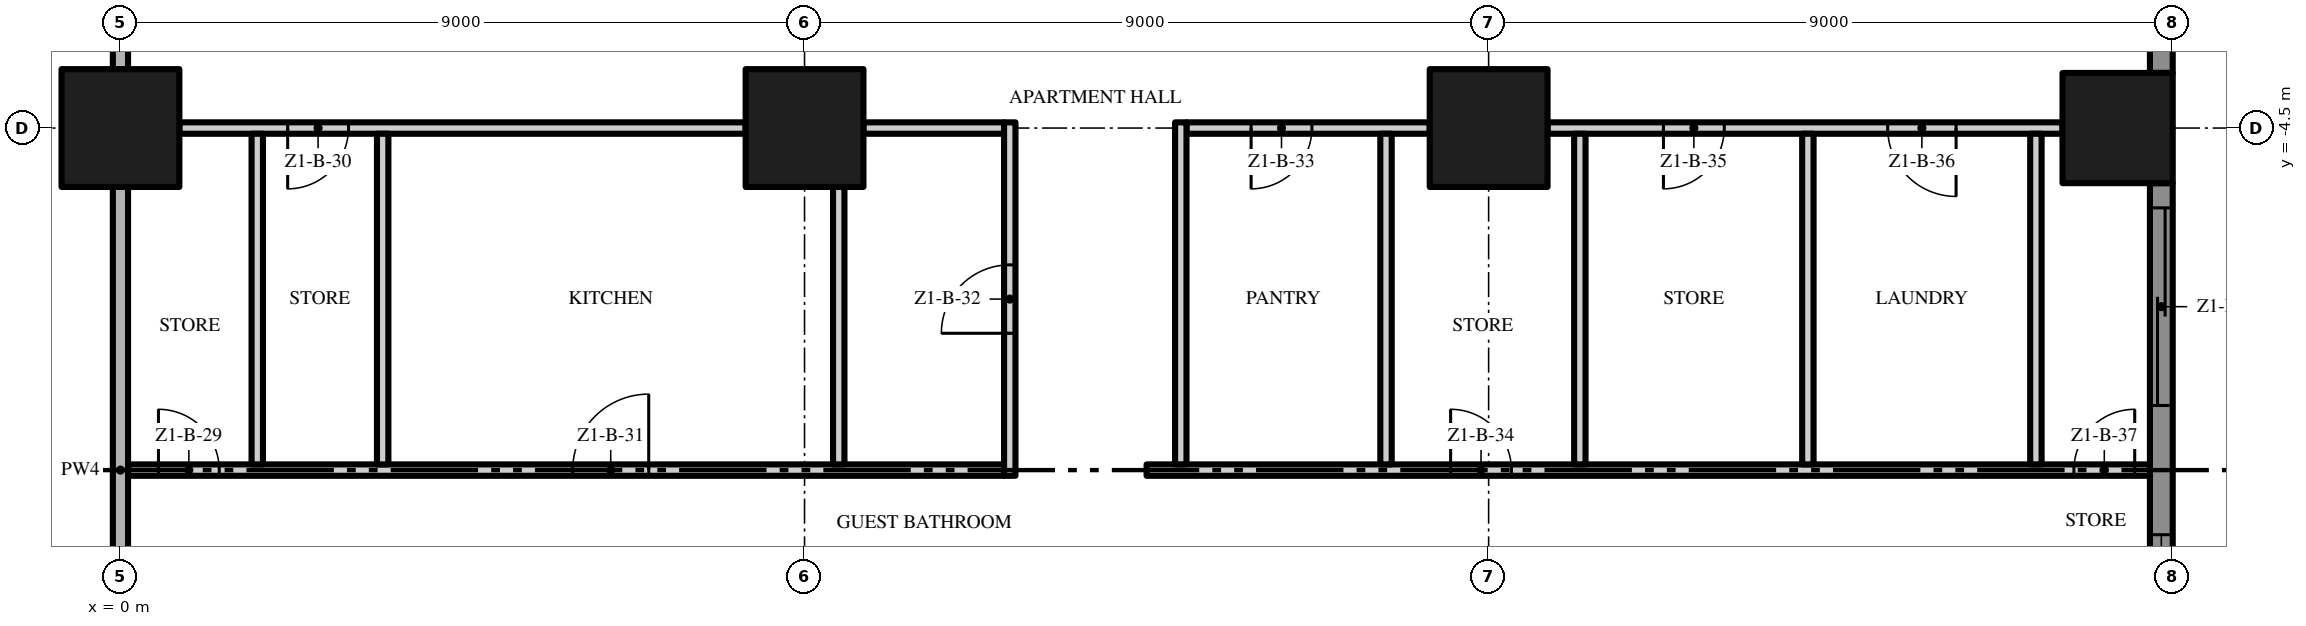
"""IFC4 building model, lengths in metres.
Left out: names, types, materials, properties, quantities, classifications, styles, units other than length and angle.
Written with IfcOpenShell. Run it as: python <this file> out.ifc"""

import sys

from ifc_helpers import new_model, si_unit, direction, frame, frame_2d, origin, origin_2d, place, context, subcontext, project, spatial, polyline, rectangle, outline, extrude, element, fill, save


model = new_model("IFC4")
c1 = context("Model", 3, precision=1e-05, world=origin(), true_north=direction((0.0, 1.0)))
c2 = subcontext(c1, "Body", "Model", "MODEL_VIEW")
j1 = project(units=[si_unit("LENGTHUNIT", "METRE"), si_unit("PLANEANGLEUNIT", "RADIAN")], contexts=[c1])
p1 = place(None, origin())
s1 = spatial("IfcSite", under=j1, at=p1, CompositionType="ELEMENT")
p2 = place(p1, origin())
s2 = spatial("IfcBuilding", under=s1, at=p2, CompositionType="ELEMENT")
p3 = place(p2, frame((0.0, 0.0, 26.4)))
s3 = spatial("IfcBuildingStorey", under=s2, at=p3, CompositionType="ELEMENT", Elevation=26.4)
for number, where, z_axis, x_axis in (
    (1, (0.0, -4.5, 0.0), (0.0, 0.0, 1.0), (1.0, 0.0, 0.0)),
    (2, (18.0, -4.5, 0.0), (0.0, 0.0, 1.0), (1.0, 0.0, 0.0)),
):
    element("IfcColumn", number, at=place(p3, frame(where, z_axis=z_axis, x_axis=x_axis)), inside=s3, PredefinedType="COLUMN", context=c2, shape_type="SweptSolid", body=[
        extrude(rectangle(XDim=1.55, YDim=1.55, at=origin_2d()), origin(), (0.0, 0.0, 1.0), 3.5),
    ])
p4 = place(p3, frame((26.275, -4.5, 0.0), z_axis=(0.0, 0.0, 1.0), x_axis=(1.0, 0.0, 0.0)))
e3 = element("IfcColumn", 3, at=p4, inside=s3, PredefinedType="COLUMN", context=c2, shape_type="SweptSolid", body=[
    extrude(rectangle(XDim=1.45, YDim=1.45, at=origin_2d()), origin(), (0.0, 0.0, 1.0), 3.5),
])
p5 = place(p3, frame((9.0, -4.5, 0.0), z_axis=(0.0, 0.0, 1.0), x_axis=(1.0, 0.0, 0.0)))
e4 = element("IfcColumn", 4, at=p5, inside=s3, PredefinedType="COLUMN", context=c2, shape_type="SweptSolid", body=[
    extrude(rectangle(XDim=1.55, YDim=1.55, at=origin_2d()), origin(), (0.0, 0.0, 1.0), 3.5),
])
p6 = place(p3, frame((26.85, -5.225, 0.0), z_axis=(0.0, 0.0, 1.0), x_axis=(0.0, -1.0, 0.0)))
e5 = element("IfcWall", 5, at=p6, inside=s3, PredefinedType="SOLIDWALL", context=c2, shape_type="SweptSolid", body=[
    extrude(rectangle(XDim=7.55, YDim=0.3, at=frame_2d((3.775, 0.0))), origin(), (0.0, 0.0, 1.0), 3.5),
])
p7 = place(p6, frame((4.625, 0.0, 0.45)))
e6 = element("IfcOpeningElement", 6, at=p7, cuts=e5, PredefinedType="OPENING", context=c2, shape_type="SweptSolid", body=[
    extrude(rectangle(XDim=2.6, YDim=2.65, at=frame_2d((1.3, 1.325))), frame((0.0, 0.16, 0.0), z_axis=(0.0, -1.0, 0.0), x_axis=(1.0, 0.0, 0.0)), (0.0, 0.0, 1.0), 0.32),
])
p8 = place(p6, frame((0.325, 0.0, 0.0)))
e7 = element("IfcOpeningElement", 7, at=p8, cuts=e5, PredefinedType="OPENING", context=c2, shape_type="SweptSolid", body=[
    extrude(rectangle(XDim=2.6, YDim=2.4, at=frame_2d((1.3, 1.2))), frame((0.0, 0.16, 0.0), z_axis=(0.0, -1.0, 0.0), x_axis=(1.0, 0.0, 0.0)), (0.0, 0.0, 1.0), 0.32),
])
p9 = place(p3, frame((26.85, 3.775, 0.0), z_axis=(0.0, 0.0, 1.0), x_axis=(0.0, -1.0, 0.0)))
e8 = element("IfcWall", 8, at=p9, inside=s3, PredefinedType="SOLIDWALL", context=c2, shape_type="SweptSolid", body=[
    extrude(rectangle(XDim=7.55, YDim=0.3, at=frame_2d((3.775, 0.0))), origin(), (0.0, 0.0, 1.0), 3.5),
])
p10 = place(p9, frame((4.625, 0.0, 0.0)))
e9 = element("IfcOpeningElement", 9, at=p10, cuts=e8, PredefinedType="OPENING", context=c2, shape_type="SweptSolid", body=[
    extrude(rectangle(XDim=2.6, YDim=2.4, at=frame_2d((1.3, 1.2))), frame((0.0, 0.16, 0.0), z_axis=(0.0, -1.0, 0.0), x_axis=(1.0, 0.0, 0.0)), (0.0, 0.0, 1.0), 0.32),
])
p11 = place(p9, frame((0.325, 0.0, 0.45)))
e10 = element("IfcOpeningElement", 10, at=p11, cuts=e8, PredefinedType="OPENING", context=c2, shape_type="SweptSolid", body=[
    extrude(rectangle(XDim=2.6, YDim=2.65, at=frame_2d((1.3, 1.325))), frame((0.0, 0.16, 0.0), z_axis=(0.0, -1.0, 0.0), x_axis=(1.0, 0.0, 0.0)), (0.0, 0.0, 1.0), 0.32),
])
p12 = place(p3, origin())
e11 = element("IfcWall", 11, at=p12, inside=s3, PredefinedType="USERDEFINED", context=c2, shape_type="SweptSolid", body=[
    extrude(outline(polyline([(29.649, -18.0), (28.988, -16.5), (28.255, -15.0), (27.731, -13.5), (27.6, -12.375), (27.615, -12.0), (27.951, -10.5), (28.612, -9.0), (29.345, -7.5), (29.869, -6.0), (30.0, -4.875), (29.985, -4.5), (29.649, -3.0), (28.988, -1.5), (28.255, 0.0), (27.731, 1.5), (27.6, 2.625), (27.615, 3.0), (27.951, 4.5), (28.612, 6.0), (29.345, 7.5), (29.869, 9.0), (30.0, 10.125), (29.985, 10.5), (29.649, 12.0), (28.988, 13.5), (28.255, 15.0), (27.731, 16.5), (27.6, 17.625), (27.615, 18.0), (27.365, 18.01), (27.349, 17.615), (27.486, 16.444), (28.024, 14.904), (28.761, 13.395), (29.41, 11.921), (29.736, 10.467), (29.749, 10.135), (29.624, 9.056), (29.114, 7.596), (28.385, 6.105), (27.713, 4.579), (27.366, 3.033), (27.349, 2.615), (27.486, 1.444), (28.024, -0.096), (28.761, -1.605), (29.41, -3.079), (29.736, -4.533), (29.749, -4.865), (29.624, -5.944), (29.114, -7.404), (28.385, -8.895), (27.713, -10.421), (27.366, -11.967), (27.349, -12.385), (27.486, -13.556), (28.024, -15.096), (28.761, -16.605), (29.42, -18.101), (29.649, -18.0)])), origin(), (0.0, 0.0, 1.0), 0.9),
])
p13 = place(p3, frame((0.1, -9.0, 0.0), z_axis=(0.0, 0.0, 1.0), x_axis=(1.0, 0.0, 0.0)))
e12 = element("IfcWall", 12, at=p13, inside=s3, PredefinedType="PARTITIONING", context=c2, shape_type="SweptSolid", body=[
    extrude(rectangle(XDim=11.525, YDim=0.15, at=frame_2d((5.763, 0.0))), origin(), (0.0, 0.0, 1.0), 3.5),
])
p14 = place(p13, frame((0.4, 0.0, 0.0)))
e13 = element("IfcOpeningElement", 13, at=p14, cuts=e12, PredefinedType="OPENING", context=c2, shape_type="SweptSolid", body=[
    extrude(rectangle(XDim=0.8, YDim=2.0, at=frame_2d((0.4, 1.0))), frame((0.0, 0.085, 0.0), z_axis=(0.0, -1.0, 0.0), x_axis=(1.0, 0.0, 0.0)), (0.0, 0.0, 1.0), 0.17),
])
p15 = place(p13, frame((5.85, 0.0, 0.0)))
e14 = element("IfcOpeningElement", 14, at=p15, cuts=e12, PredefinedType="OPENING", context=c2, shape_type="SweptSolid", body=[
    extrude(rectangle(XDim=1.0, YDim=2.4, at=frame_2d((0.5, 1.2))), frame((0.0, 0.085, 0.0), z_axis=(0.0, -1.0, 0.0), x_axis=(1.0, 0.0, 0.0)), (0.0, 0.0, 1.0), 0.17),
])
p16 = place(p3, frame((13.5, -9.0, 0.0), z_axis=(0.0, 0.0, 1.0), x_axis=(1.0, 0.0, 0.0)))
e15 = element("IfcWall", 15, at=p16, inside=s3, PredefinedType="PARTITIONING", context=c2, shape_type="SweptSolid", body=[
    extrude(rectangle(XDim=13.2, YDim=0.15, at=frame_2d((6.6, 0.0))), origin(), (0.0, 0.0, 1.0), 3.5),
])
p17 = place(p16, frame((4.0, 0.0, 0.0)))
e16 = element("IfcOpeningElement", 16, at=p17, cuts=e15, PredefinedType="OPENING", context=c2, shape_type="SweptSolid", body=[
    extrude(rectangle(XDim=0.8, YDim=2.0, at=frame_2d((0.4, 1.0))), frame((0.0, 0.085, 0.0), z_axis=(0.0, -1.0, 0.0), x_axis=(1.0, 0.0, 0.0)), (0.0, 0.0, 1.0), 0.17),
])
p18 = place(p16, frame((12.2, 0.0, 0.0)))
e17 = element("IfcOpeningElement", 17, at=p18, cuts=e15, PredefinedType="OPENING", context=c2, shape_type="SweptSolid", body=[
    extrude(rectangle(XDim=0.8, YDim=2.0, at=frame_2d((0.4, 1.0))), frame((0.0, 0.085, 0.0), z_axis=(0.0, -1.0, 0.0), x_axis=(1.0, 0.0, 0.0)), (0.0, 0.0, 1.0), 0.17),
])
p19 = place(p3, frame((8.225, -4.5, 0.0), z_axis=(0.0, 0.0, 1.0), x_axis=(-1.0, 0.0, 0.0)))
e18 = element("IfcWall", 18, at=p19, inside=s3, PredefinedType="PARTITIONING", context=c2, shape_type="SweptSolid", body=[
    extrude(rectangle(XDim=7.45, YDim=0.15, at=frame_2d((3.725, 0.0))), origin(), (0.0, 0.0, 1.0), 3.5),
])
p20 = place(p19, frame((5.225, 0.0, 0.0)))
e19 = element("IfcOpeningElement", 19, at=p20, cuts=e18, PredefinedType="OPENING", context=c2, shape_type="SweptSolid", body=[
    extrude(rectangle(XDim=0.8, YDim=2.0, at=frame_2d((0.4, 1.0))), frame((0.0, 0.085, 0.0), z_axis=(0.0, -1.0, 0.0), x_axis=(1.0, 0.0, 0.0)), (0.0, 0.0, 1.0), 0.17),
])
p21 = place(p3, frame((9.775, -4.5, 0.0), z_axis=(0.0, 0.0, 1.0), x_axis=(1.0, 0.0, 0.0)))
e20 = element("IfcWall", 20, at=p21, inside=s3, PredefinedType="PARTITIONING", context=c2, shape_type="SweptSolid", body=[
    extrude(rectangle(XDim=1.85, YDim=0.15, at=frame_2d((0.925, 0.0))), origin(), (0.0, 0.0, 1.0), 3.5),
])
p22 = place(p3, frame((17.225, -4.5, 0.0), z_axis=(0.0, 0.0, 1.0), x_axis=(-1.0, 0.0, 0.0)))
e21 = element("IfcWall", 21, at=p22, inside=s3, PredefinedType="PARTITIONING", context=c2, shape_type="SweptSolid", body=[
    extrude(rectangle(XDim=3.2, YDim=0.15, at=frame_2d((1.6, 0.0))), origin(), (0.0, 0.0, 1.0), 3.5),
])
p23 = place(p22, frame((1.55, 0.0, 0.0)))
e22 = element("IfcOpeningElement", 22, at=p23, cuts=e21, PredefinedType="OPENING", context=c2, shape_type="SweptSolid", body=[
    extrude(rectangle(XDim=0.8, YDim=2.0, at=frame_2d((0.4, 1.0))), frame((0.0, 0.085, 0.0), z_axis=(0.0, -1.0, 0.0), x_axis=(1.0, 0.0, 0.0)), (0.0, 0.0, 1.0), 0.17),
])
p24 = place(p3, frame((25.55, -4.5, 0.0), z_axis=(0.0, 0.0, 1.0), x_axis=(-1.0, 0.0, 0.0)))
e23 = element("IfcWall", 23, at=p24, inside=s3, PredefinedType="PARTITIONING", context=c2, shape_type="SweptSolid", body=[
    extrude(rectangle(XDim=6.775, YDim=0.15, at=frame_2d((3.388, 0.0))), origin(), (0.0, 0.0, 1.0), 3.5),
])
p25 = place(p24, frame((4.45, 0.0, 0.0)))
e24 = element("IfcOpeningElement", 24, at=p25, cuts=e23, PredefinedType="OPENING", context=c2, shape_type="SweptSolid", body=[
    extrude(rectangle(XDim=0.8, YDim=2.0, at=frame_2d((0.4, 1.0))), frame((0.0, 0.085, 0.0), z_axis=(0.0, -1.0, 0.0), x_axis=(1.0, 0.0, 0.0)), (0.0, 0.0, 1.0), 0.17),
])
p26 = place(p24, frame((1.4, 0.0, 0.0)))
e25 = element("IfcOpeningElement", 25, at=p26, cuts=e23, PredefinedType="OPENING", context=c2, shape_type="SweptSolid", body=[
    extrude(rectangle(XDim=0.9, YDim=2.1, at=frame_2d((0.45, 1.05))), frame((0.0, 0.085, 0.0), z_axis=(0.0, -1.0, 0.0), x_axis=(1.0, 0.0, 0.0)), (0.0, 0.0, 1.0), 0.17),
])
p27 = place(p3, frame((0.0, -12.725, 0.0), z_axis=(0.0, 0.0, 1.0), x_axis=(0.0, 1.0, 0.0)))
e26 = element("IfcWall", 26, at=p27, inside=s3, PredefinedType="PARTITIONING", context=c2, shape_type="SweptSolid", body=[
    extrude(rectangle(XDim=7.45, YDim=0.2, at=frame_2d((3.725, 0.0))), origin(), (0.0, 0.0, 1.0), 3.5),
])
p28 = place(p3, frame((0.0, -3.725, 0.0), z_axis=(0.0, 0.0, 1.0), x_axis=(0.0, 1.0, 0.0)))
e27 = element("IfcWall", 27, at=p28, inside=s3, PredefinedType="PARTITIONING", context=c2, shape_type="SweptSolid", body=[
    extrude(rectangle(XDim=3.825, YDim=0.2, at=frame_2d((1.913, 0.0))), origin(), (0.0, 0.0, 1.0), 3.5),
])
for number, where, z_axis, x_axis in (
    (28, (1.8, -8.925, 0.0), (0.0, 0.0, 1.0), (0.0, 1.0, 0.0)),
    (29, (3.45, -8.925, 0.0), (0.0, 0.0, 1.0), (0.0, 1.0, 0.0)),
):
    element("IfcWall", number, at=place(p3, frame(where, z_axis=z_axis, x_axis=x_axis)), inside=s3, PredefinedType="PARTITIONING", context=c2, shape_type="SweptSolid", body=[
        extrude(rectangle(XDim=4.35, YDim=0.15, at=frame_2d((2.175, 0.0))), origin(), (0.0, 0.0, 1.0), 3.5),
    ])
p29 = place(p3, frame((9.45, -8.925, 0.0), z_axis=(0.0, 0.0, 1.0), x_axis=(0.0, 1.0, 0.0)))
e30 = element("IfcWall", 30, at=p29, inside=s3, PredefinedType="PARTITIONING", context=c2, shape_type="SweptSolid", body=[
    extrude(rectangle(XDim=3.65, YDim=0.15, at=frame_2d((1.825, 0.0))), origin(), (0.0, 0.0, 1.0), 3.5),
])
p30 = place(p3, frame((11.7, -9.075, 0.0), z_axis=(0.0, 0.0, 1.0), x_axis=(0.0, 1.0, 0.0)))
e31 = element("IfcWall", 31, at=p30, inside=s3, PredefinedType="PARTITIONING", context=c2, shape_type="SweptSolid", body=[
    extrude(rectangle(XDim=4.65, YDim=0.15, at=frame_2d((2.325, 0.0))), origin(), (0.0, 0.0, 1.0), 3.5),
])
p31 = place(p30, frame((1.875, 0.0, 0.0)))
e32 = element("IfcOpeningElement", 32, at=p31, cuts=e31, PredefinedType="OPENING", context=c2, shape_type="SweptSolid", body=[
    extrude(rectangle(XDim=0.9, YDim=2.1, at=frame_2d((0.45, 1.05))), frame((0.0, 0.085, 0.0), z_axis=(0.0, -1.0, 0.0), x_axis=(1.0, 0.0, 0.0)), (0.0, 0.0, 1.0), 0.17),
])
p32 = place(p3, frame((13.95, -8.925, 0.0), z_axis=(0.0, 0.0, 1.0), x_axis=(0.0, 1.0, 0.0)))
e33 = element("IfcWall", 33, at=p32, inside=s3, PredefinedType="PARTITIONING", context=c2, shape_type="SweptSolid", body=[
    extrude(rectangle(XDim=4.5, YDim=0.15, at=frame_2d((2.25, 0.0))), origin(), (0.0, 0.0, 1.0), 3.5),
])
for number, where, z_axis, x_axis in (
    (34, (16.65, -8.925, 0.0), (0.0, 0.0, 1.0), (0.0, 1.0, 0.0)),
    (35, (19.2, -8.925, 0.0), (0.0, 0.0, 1.0), (0.0, 1.0, 0.0)),
    (36, (22.2, -8.925, 0.0), (0.0, 0.0, 1.0), (0.0, 1.0, 0.0)),
    (37, (25.2, -8.925, 0.0), (0.0, 0.0, 1.0), (0.0, 1.0, 0.0)),
):
    element("IfcWall", number, at=place(p3, frame(where, z_axis=z_axis, x_axis=x_axis)), inside=s3, PredefinedType="PARTITIONING", context=c2, shape_type="SweptSolid", body=[
        extrude(rectangle(XDim=4.35, YDim=0.15, at=frame_2d((2.175, 0.0))), origin(), (0.0, 0.0, 1.0), 3.5),
    ])
p33 = place(p7, origin())
e38 = element("IfcWindow", 38, at=p33, inside=s3, PartitioningType="SINGLE_PANEL", PredefinedType="WINDOW", context=c2, shape_type="SweptSolid", body=[
    extrude(rectangle(XDim=2.6, YDim=2.65, at=frame_2d((1.3, 1.325))), frame((0.0, 0.03, 0.0), z_axis=(0.0, -1.0, 0.0), x_axis=(1.0, 0.0, 0.0)), (0.0, 0.0, 1.0), 0.06),
])
fill(e6, e38)
p34 = place(p8, origin())
e39 = element("IfcDoor", 39, at=p34, inside=s3, OperationType="SINGLE_SWING_LEFT", PredefinedType="DOOR", context=c2, shape_type="SweptSolid", body=[
    extrude(rectangle(XDim=2.6, YDim=2.4, at=frame_2d((1.3, 1.2))), frame((0.0, 0.025, 0.0), z_axis=(0.0, -1.0, 0.0), x_axis=(1.0, 0.0, 0.0)), (0.0, 0.0, 1.0), 0.05),
])
fill(e7, e39)
p35 = place(p14, origin())
e40 = element("IfcDoor", 40, at=p35, inside=s3, OperationType="SINGLE_SWING_LEFT", PredefinedType="DOOR", context=c2, shape_type="SweptSolid", body=[
    extrude(rectangle(XDim=0.8, YDim=2.0, at=frame_2d((0.4, 1.0))), frame((0.0, 0.025, 0.0), z_axis=(0.0, -1.0, 0.0), x_axis=(1.0, 0.0, 0.0)), (0.0, 0.0, 1.0), 0.05),
])
fill(e13, e40)
p36 = place(p20, origin())
e41 = element("IfcDoor", 41, at=p36, inside=s3, OperationType="SINGLE_SWING_RIGHT", PredefinedType="DOOR", context=c2, shape_type="SweptSolid", body=[
    extrude(rectangle(XDim=0.8, YDim=2.0, at=frame_2d((0.4, 1.0))), frame((0.0, 0.025, 0.0), z_axis=(0.0, -1.0, 0.0), x_axis=(1.0, 0.0, 0.0)), (0.0, 0.0, 1.0), 0.05),
])
fill(e19, e41)
p37 = place(p15, origin())
e42 = element("IfcDoor", 42, at=p37, inside=s3, OperationType="SINGLE_SWING_RIGHT", PredefinedType="DOOR", context=c2, shape_type="SweptSolid", body=[
    extrude(rectangle(XDim=1.0, YDim=2.4, at=frame_2d((0.5, 1.2))), frame((0.0, 0.025, 0.0), z_axis=(0.0, -1.0, 0.0), x_axis=(1.0, 0.0, 0.0)), (0.0, 0.0, 1.0), 0.05),
])
fill(e14, e42)
p38 = place(p31, origin())
e43 = element("IfcDoor", 43, at=p38, inside=s3, OperationType="SINGLE_SWING_LEFT", PredefinedType="DOOR", context=c2, shape_type="SweptSolid", body=[
    extrude(rectangle(XDim=0.9, YDim=2.1, at=frame_2d((0.45, 1.05))), frame((0.0, 0.025, 0.0), z_axis=(0.0, -1.0, 0.0), x_axis=(1.0, 0.0, 0.0)), (0.0, 0.0, 1.0), 0.05),
])
fill(e32, e43)
p39 = place(p23, origin())
e44 = element("IfcDoor", 44, at=p39, inside=s3, OperationType="SINGLE_SWING_RIGHT", PredefinedType="DOOR", context=c2, shape_type="SweptSolid", body=[
    extrude(rectangle(XDim=0.8, YDim=2.0, at=frame_2d((0.4, 1.0))), frame((0.0, 0.025, 0.0), z_axis=(0.0, -1.0, 0.0), x_axis=(1.0, 0.0, 0.0)), (0.0, 0.0, 1.0), 0.05),
])
fill(e22, e44)
p40 = place(p17, origin())
e45 = element("IfcDoor", 45, at=p40, inside=s3, OperationType="SINGLE_SWING_LEFT", PredefinedType="DOOR", context=c2, shape_type="SweptSolid", body=[
    extrude(rectangle(XDim=0.8, YDim=2.0, at=frame_2d((0.4, 1.0))), frame((0.0, 0.025, 0.0), z_axis=(0.0, -1.0, 0.0), x_axis=(1.0, 0.0, 0.0)), (0.0, 0.0, 1.0), 0.05),
])
fill(e16, e45)
p41 = place(p25, origin())
e46 = element("IfcDoor", 46, at=p41, inside=s3, OperationType="SINGLE_SWING_RIGHT", PredefinedType="DOOR", context=c2, shape_type="SweptSolid", body=[
    extrude(rectangle(XDim=0.8, YDim=2.0, at=frame_2d((0.4, 1.0))), frame((0.0, 0.025, 0.0), z_axis=(0.0, -1.0, 0.0), x_axis=(1.0, 0.0, 0.0)), (0.0, 0.0, 1.0), 0.05),
])
fill(e24, e46)
p42 = place(p26, origin())
e47 = element("IfcDoor", 47, at=p42, inside=s3, OperationType="SINGLE_SWING_LEFT", PredefinedType="DOOR", context=c2, shape_type="SweptSolid", body=[
    extrude(rectangle(XDim=0.9, YDim=2.1, at=frame_2d((0.45, 1.05))), frame((0.0, 0.025, 0.0), z_axis=(0.0, -1.0, 0.0), x_axis=(1.0, 0.0, 0.0)), (0.0, 0.0, 1.0), 0.05),
])
fill(e25, e47)
p43 = place(p18, origin())
e48 = element("IfcDoor", 48, at=p43, inside=s3, OperationType="SINGLE_SWING_RIGHT", PredefinedType="DOOR", context=c2, shape_type="SweptSolid", body=[
    extrude(rectangle(XDim=0.8, YDim=2.0, at=frame_2d((0.4, 1.0))), frame((0.0, 0.025, 0.0), z_axis=(0.0, -1.0, 0.0), x_axis=(1.0, 0.0, 0.0)), (0.0, 0.0, 1.0), 0.05),
])
fill(e17, e48)
save(model, sys.argv[1])
